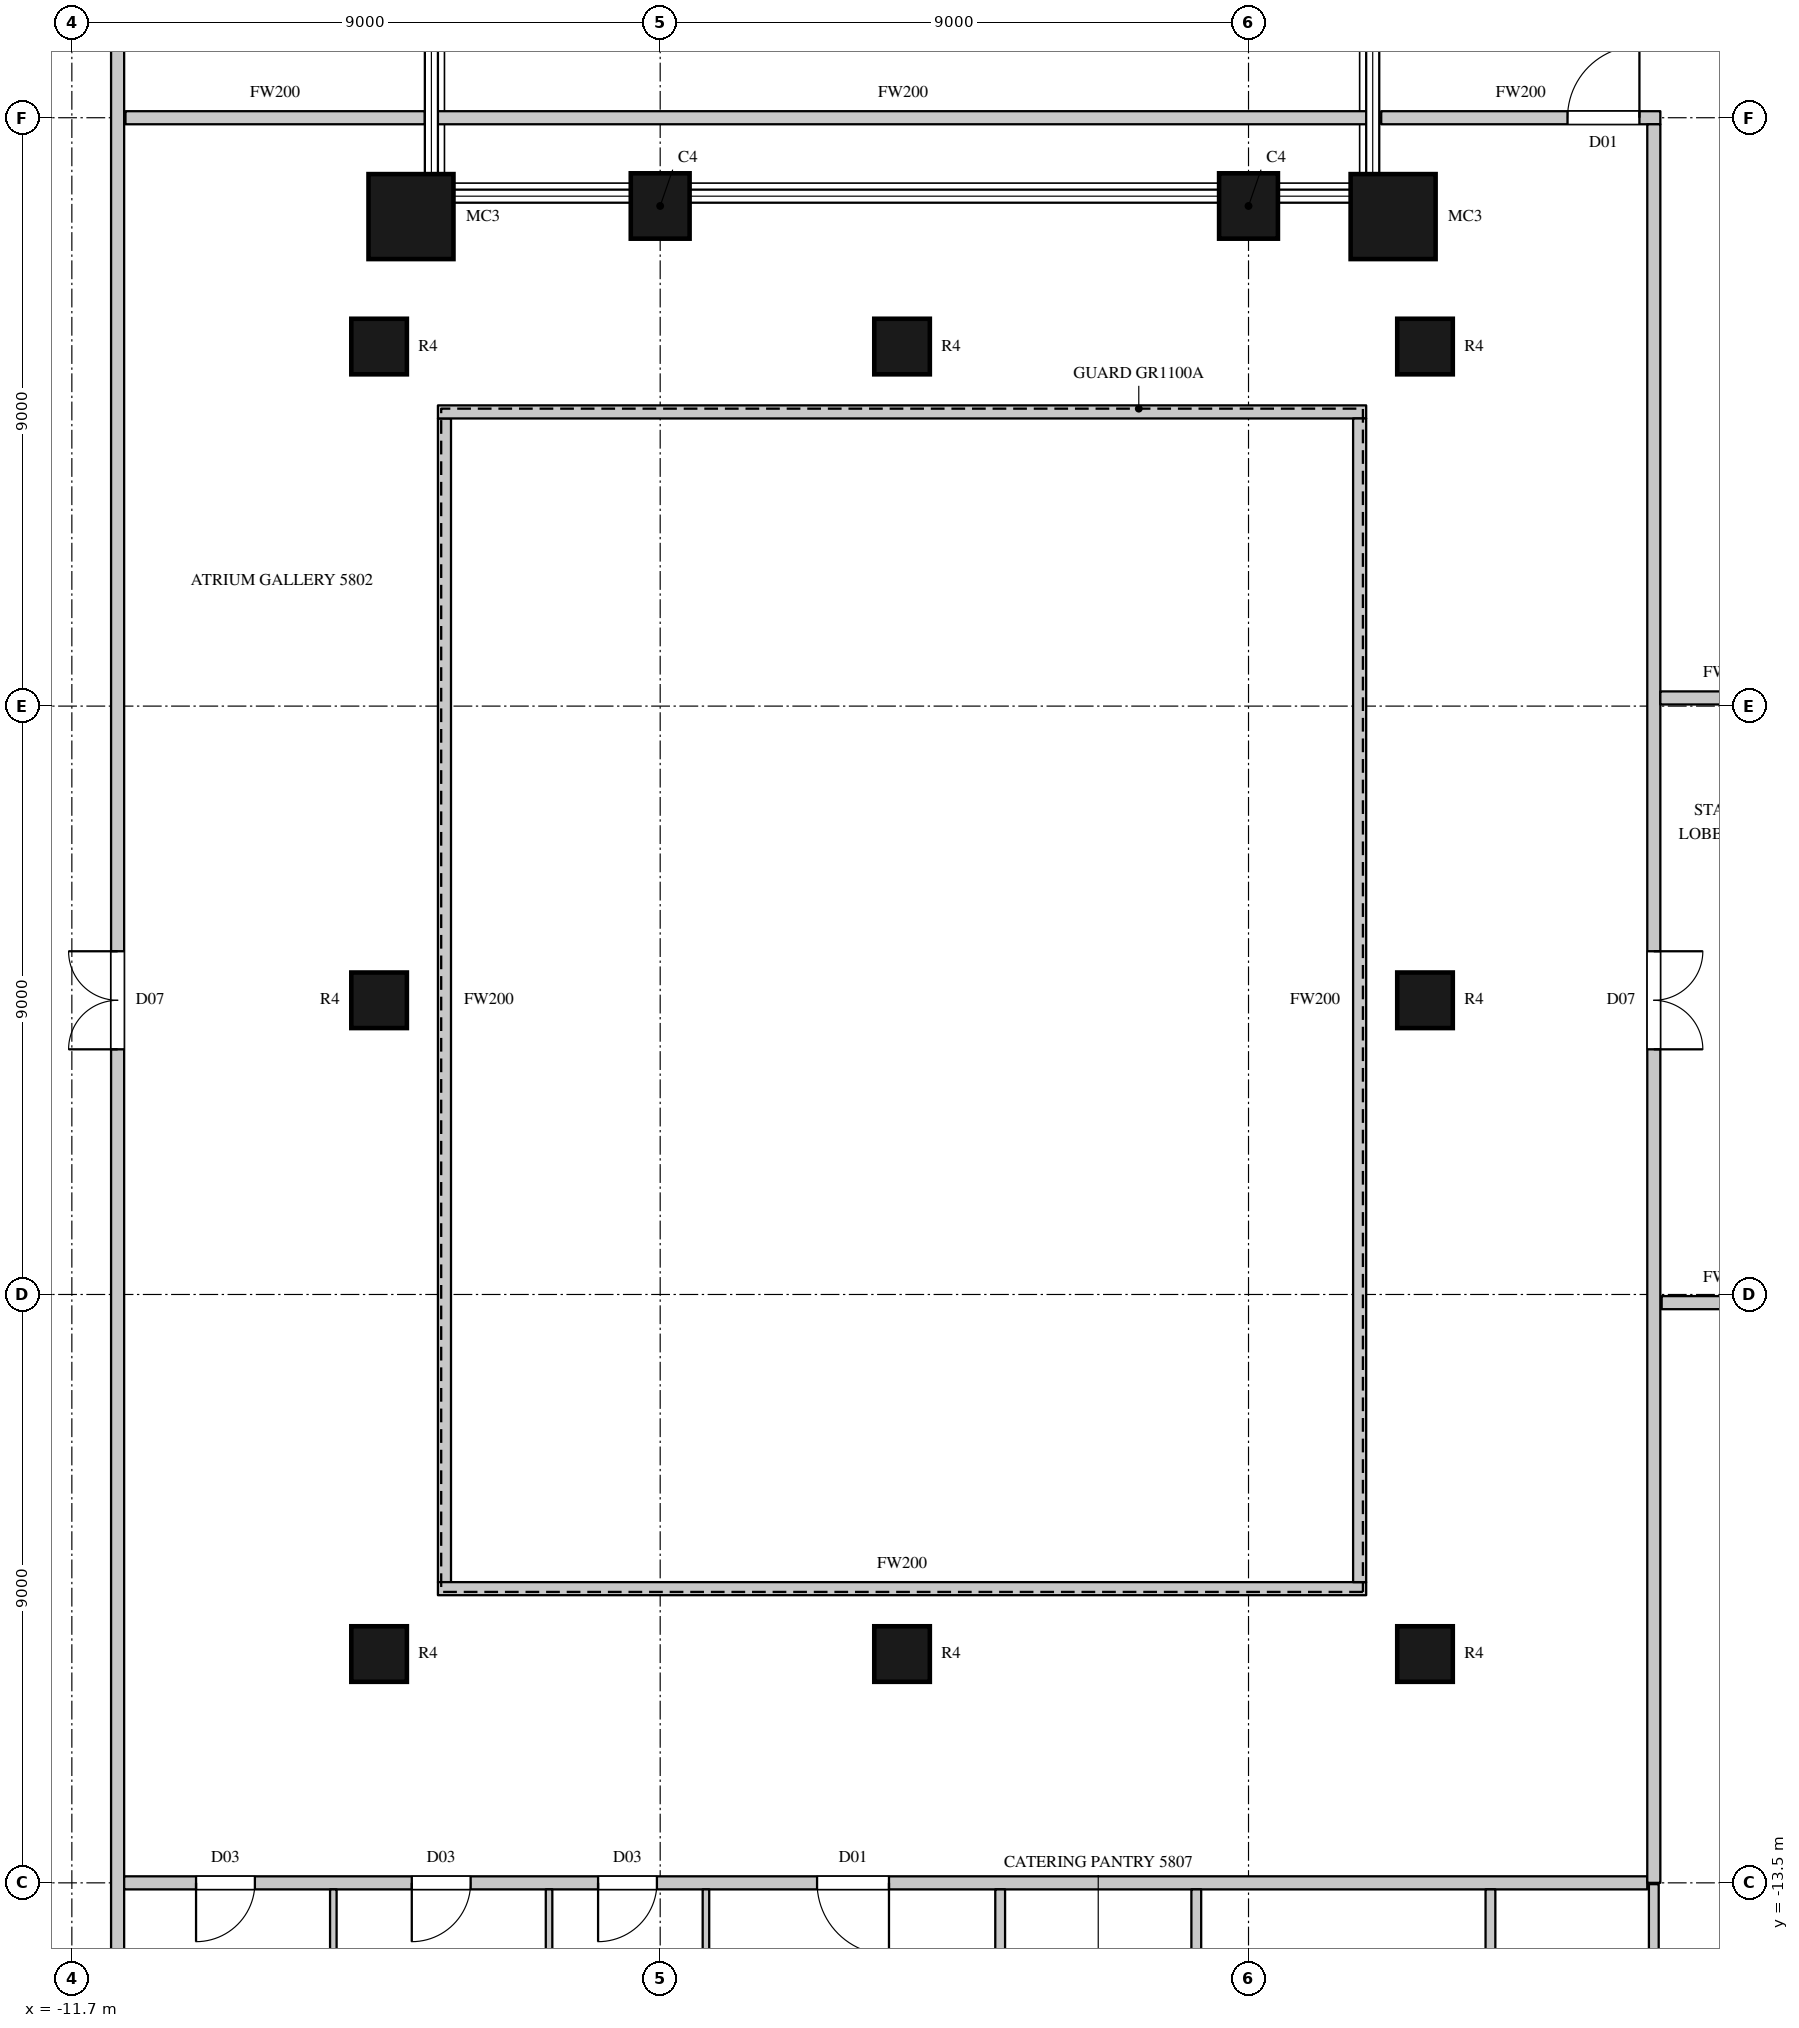
"""IFC4 building model, lengths in metres.
Left out: names, types, materials, properties, quantities, classifications, styles, units other than length and angle.
Written with IfcOpenShell. Run it as: python <this file> out.ifc"""

import sys

from ifc_helpers import new_model, si_unit, direction, frame, frame_2d, origin, origin_2d, place, context, subcontext, project, spatial, rectangle, circle, extrude, element, fill, save


model = new_model("IFC4")
c1 = context("Model", 3, precision=1e-05, world=origin(), true_north=direction((0.0, 1.0)))
c2 = subcontext(c1, "Body", "Model", "MODEL_VIEW")
j1 = project(units=[si_unit("LENGTHUNIT", "METRE"), si_unit("PLANEANGLEUNIT", "RADIAN")], contexts=[c1])
p1 = place(None, origin())
s1 = spatial("IfcSite", under=j1, at=p1, CompositionType="ELEMENT")
p2 = place(p1, origin())
s2 = spatial("IfcBuilding", under=s1, at=p2, CompositionType="ELEMENT")
p3 = place(p2, frame((0.0, 0.0, 259.8)))
s3 = spatial("IfcBuildingStorey", under=s2, at=p3, CompositionType="ELEMENT", Elevation=259.8)
p4 = place(p3, frame((8.512, 11.988, 0.0), z_axis=(0.0, 0.0, 1.0), x_axis=(1.0, 0.0, 0.0)))
e1 = element("IfcColumn", 1, at=p4, inside=s3, PredefinedType="COLUMN", context=c2, shape_type="SweptSolid", body=[
    extrude(circle(Radius=0.65, at=origin_2d()), origin(), (0.0, 0.0, 1.0), 4.1),
])
for number, where, z_axis, x_axis in (
    (2, (6.3, 12.15, 0.0), (0.0, 0.0, 1.0), (-1.0, 0.0, 0.0)),
    (3, (-2.7, 12.15, 0.0), (0.0, 0.0, 1.0), (-1.0, 0.0, 0.0)),
):
    element("IfcColumn", number, at=place(p3, frame(where, z_axis=z_axis, x_axis=x_axis)), inside=s3, PredefinedType="COLUMN", context=c2, shape_type="SweptSolid", body=[
        extrude(rectangle(XDim=0.9, YDim=1.0, at=origin_2d()), origin(), (0.0, 0.0, 1.0), 4.1),
    ])
p5 = place(p3, frame((-6.512, 11.988, 0.0), z_axis=(0.0, 0.0, 1.0), x_axis=(1.0, 0.0, 0.0)))
e4 = element("IfcColumn", 4, at=p5, inside=s3, PredefinedType="COLUMN", context=c2, shape_type="SweptSolid", body=[
    extrude(circle(Radius=0.65, at=origin_2d()), origin(), (0.0, 0.0, 1.0), 4.1),
])
for number, where, z_axis, x_axis in (
    (5, (-7.0, -10.0, 0.0), (0.0, 0.0, 1.0), (1.0, 0.0, 0.0)),
    (6, (-7.0, 0.0, 0.0), (0.0, 0.0, 1.0), (1.0, 0.0, 0.0)),
    (7, (-7.0, 10.0, 0.0), (0.0, 0.0, 1.0), (1.0, 0.0, 0.0)),
    (8, (1.0, -10.0, 0.0), (0.0, 0.0, 1.0), (1.0, 0.0, 0.0)),
    (9, (1.0, 10.0, 0.0), (0.0, 0.0, 1.0), (1.0, 0.0, 0.0)),
    (10, (9.0, -10.0, 0.0), (0.0, 0.0, 1.0), (1.0, 0.0, 0.0)),
    (11, (9.0, 0.0, 0.0), (0.0, 0.0, 1.0), (1.0, 0.0, 0.0)),
    (12, (9.0, 10.0, 0.0), (0.0, 0.0, 1.0), (1.0, 0.0, 0.0)),
):
    element("IfcColumn", number, at=place(p3, frame(where, z_axis=z_axis, x_axis=x_axis)), inside=s3, PredefinedType="COLUMN", context=c2, shape_type="SweptSolid", body=[
        extrude(circle(Radius=0.425, at=origin_2d()), origin(), (0.0, 0.0, 1.0), 4.1),
    ])
p6 = place(p3, frame((-11.0, -14.8, 0.0), z_axis=(0.0, 0.0, 1.0), x_axis=(0.0, 1.0, 0.0)))
e13 = element("IfcWall", 13, at=p6, inside=s3, PredefinedType="PARTITIONING", context=c2, shape_type="SweptSolid", body=[
    extrude(rectangle(XDim=29.5, YDim=0.2, at=frame_2d((14.75, 0.0))), origin(), (0.0, 0.0, 1.0), 3.8),
])
p7 = place(p6, frame((14.05, 0.0, 0.0)))
e14 = element("IfcOpeningElement", 14, at=p7, cuts=e13, PredefinedType="OPENING", context=c2, shape_type="SweptSolid", body=[
    extrude(rectangle(XDim=1.5, YDim=2.4, at=frame_2d((0.75, 1.2))), frame((0.0, 0.11, 0.0), z_axis=(0.0, -1.0, 0.0), x_axis=(1.0, 0.0, 0.0)), (0.0, 0.0, 1.0), 0.22),
])
p8 = place(p3, frame((-10.9, -13.5, 0.0), z_axis=(0.0, 0.0, 1.0), x_axis=(1.0, 0.0, 0.0)))
e15 = element("IfcWall", 15, at=p8, inside=s3, PredefinedType="PARTITIONING", context=c2, shape_type="SweptSolid", body=[
    extrude(rectangle(XDim=23.3, YDim=0.2, at=frame_2d((11.65, 0.0))), origin(), (0.0, 0.0, 1.0), 3.8),
])
p9 = place(p8, frame((1.1, 0.0, 0.0)))
e16 = element("IfcOpeningElement", 16, at=p9, cuts=e15, PredefinedType="OPENING", context=c2, shape_type="SweptSolid", body=[
    extrude(rectangle(XDim=0.9, YDim=2.2, at=frame_2d((0.45, 1.1))), frame((0.0, 0.11, 0.0), z_axis=(0.0, -1.0, 0.0), x_axis=(1.0, 0.0, 0.0)), (0.0, 0.0, 1.0), 0.22),
])
p10 = place(p8, frame((4.4, 0.0, 0.0)))
e17 = element("IfcOpeningElement", 17, at=p10, cuts=e15, PredefinedType="OPENING", context=c2, shape_type="SweptSolid", body=[
    extrude(rectangle(XDim=0.9, YDim=2.2, at=frame_2d((0.45, 1.1))), frame((0.0, 0.11, 0.0), z_axis=(0.0, -1.0, 0.0), x_axis=(1.0, 0.0, 0.0)), (0.0, 0.0, 1.0), 0.22),
])
p11 = place(p8, frame((7.25, 0.0, 0.0)))
e18 = element("IfcOpeningElement", 18, at=p11, cuts=e15, PredefinedType="OPENING", context=c2, shape_type="SweptSolid", body=[
    extrude(rectangle(XDim=0.9, YDim=2.2, at=frame_2d((0.45, 1.1))), frame((0.0, 0.11, 0.0), z_axis=(0.0, -1.0, 0.0), x_axis=(1.0, 0.0, 0.0)), (0.0, 0.0, 1.0), 0.22),
])
p12 = place(p8, frame((10.6, 0.0, 0.0)))
e19 = element("IfcOpeningElement", 19, at=p12, cuts=e15, PredefinedType="OPENING", context=c2, shape_type="SweptSolid", body=[
    extrude(rectangle(XDim=1.1, YDim=2.4, at=frame_2d((0.55, 1.2))), frame((0.0, 0.11, 0.0), z_axis=(0.0, -1.0, 0.0), x_axis=(1.0, 0.0, 0.0)), (0.0, 0.0, 1.0), 0.22),
])
p13 = place(p3, frame((-10.88, 13.5, 0.0), z_axis=(0.0, 0.0, 1.0), x_axis=(1.0, 0.0, 0.0)))
e20 = element("IfcWall", 20, at=p13, inside=s3, PredefinedType="PARTITIONING", context=c2, shape_type="SweptSolid", body=[
    extrude(rectangle(XDim=4.58, YDim=0.2, at=frame_2d((2.29, 0.0))), origin(), (0.0, 0.0, 1.0), 3.8),
])
p14 = place(p3, frame((-6.27, 13.5, 0.0), z_axis=(0.0, 0.0, 1.0), x_axis=(1.0, 0.0, 0.0)))
e21 = element("IfcWall", 21, at=p14, inside=s3, PredefinedType="PARTITIONING", context=c2, shape_type="SweptSolid", body=[
    extrude(rectangle(XDim=14.57, YDim=0.2, at=frame_2d((7.285, 0.0))), origin(), (0.0, 0.0, 1.0), 3.8),
])
p15 = place(p3, frame((-6.0, -8.9, 0.0), z_axis=(0.0, 0.0, 1.0), x_axis=(0.0, 1.0, 0.0)))
e22 = element("IfcWall", 22, at=p15, inside=s3, PredefinedType="PARTITIONING", context=c2, shape_type="SweptSolid", body=[
    extrude(rectangle(XDim=17.8, YDim=0.2, at=frame_2d((8.9, 0.0))), origin(), (0.0, 0.0, 1.0), 3.8),
])
for number, where, z_axis, x_axis in (
    (23, (-6.1, -9.0, 0.0), (0.0, 0.0, 1.0), (1.0, 0.0, 0.0)),
    (24, (-6.1, 9.0, 0.0), (0.0, 0.0, 1.0), (1.0, 0.0, 0.0)),
):
    element("IfcWall", number, at=place(p3, frame(where, z_axis=z_axis, x_axis=x_axis)), inside=s3, PredefinedType="PARTITIONING", context=c2, shape_type="SweptSolid", body=[
        extrude(rectangle(XDim=14.2, YDim=0.2, at=frame_2d((7.1, 0.0))), origin(), (0.0, 0.0, 1.0), 3.8),
    ])
p16 = place(p3, frame((8.0, -8.9, 0.0), z_axis=(0.0, 0.0, 1.0), x_axis=(0.0, 1.0, 0.0)))
e25 = element("IfcWall", 25, at=p16, inside=s3, PredefinedType="PARTITIONING", context=c2, shape_type="SweptSolid", body=[
    extrude(rectangle(XDim=17.8, YDim=0.2, at=frame_2d((8.9, 0.0))), origin(), (0.0, 0.0, 1.0), 3.8),
])
p17 = place(p3, frame((8.33, 13.5, 0.0), z_axis=(0.0, 0.0, 1.0), x_axis=(1.0, 0.0, 0.0)))
e26 = element("IfcWall", 26, at=p17, inside=s3, PredefinedType="PARTITIONING", context=c2, shape_type="SweptSolid", body=[
    extrude(rectangle(XDim=4.27, YDim=0.2, at=frame_2d((2.135, 0.0))), origin(), (0.0, 0.0, 1.0), 3.8),
])
p18 = place(p17, frame((2.85, 0.0, 0.0)))
e27 = element("IfcOpeningElement", 27, at=p18, cuts=e26, PredefinedType="OPENING", context=c2, shape_type="SweptSolid", body=[
    extrude(rectangle(XDim=1.1, YDim=2.4, at=frame_2d((0.55, 1.2))), frame((0.0, 0.11, 0.0), z_axis=(0.0, -1.0, 0.0), x_axis=(1.0, 0.0, 0.0)), (0.0, 0.0, 1.0), 0.22),
])
p19 = place(p3, frame((12.5, -13.5, 0.0), z_axis=(0.0, 0.0, 1.0), x_axis=(0.0, 1.0, 0.0)))
e28 = element("IfcWall", 28, at=p19, inside=s3, PredefinedType="PARTITIONING", context=c2, shape_type="SweptSolid", body=[
    extrude(rectangle(XDim=26.9, YDim=0.2, at=frame_2d((13.45, 0.0))), origin(), (0.0, 0.0, 1.0), 3.8),
])
p20 = place(p19, frame((12.75, 0.0, 0.0)))
e29 = element("IfcOpeningElement", 29, at=p20, cuts=e28, PredefinedType="OPENING", context=c2, shape_type="SweptSolid", body=[
    extrude(rectangle(XDim=1.5, YDim=2.4, at=frame_2d((0.75, 1.2))), frame((0.0, 0.11, 0.0), z_axis=(0.0, -1.0, 0.0), x_axis=(1.0, 0.0, 0.0)), (0.0, 0.0, 1.0), 0.22),
])
p21 = place(p3, frame((12.6, 4.625, 0.0), z_axis=(0.0, 0.0, 1.0), x_axis=(1.0, 0.0, 0.0)))
e30 = element("IfcWall", 30, at=p21, inside=s3, PredefinedType="PARTITIONING", context=c2, shape_type="SweptSolid", body=[
    extrude(rectangle(XDim=2.075, YDim=0.2, at=frame_2d((1.038, 0.0))), origin(), (0.0, 0.0, 1.0), 3.8),
])
p22 = place(p3, frame((12.62, -4.625, 0.0), z_axis=(0.0, 0.0, 1.0), x_axis=(1.0, 0.0, 0.0)))
e31 = element("IfcWall", 31, at=p22, inside=s3, PredefinedType="PARTITIONING", context=c2, shape_type="SweptSolid", body=[
    extrude(rectangle(XDim=2.035, YDim=0.2, at=frame_2d((1.018, 0.0))), origin(), (0.0, 0.0, 1.0), 3.8),
])
p23 = place(p3, frame((2.501, -17.625, 0.0), z_axis=(0.0, 0.0, 1.0), x_axis=(0.0, 1.0, 0.0)))
e32 = element("IfcWall", 32, at=p23, inside=s3, PredefinedType="PARTITIONING", context=c2, shape_type="SweptSolid", body=[
    extrude(rectangle(XDim=4.025, YDim=0.15, at=frame_2d((2.012, 0.0))), origin(), (0.0, 0.0, 1.0), 3.8),
])
p24 = place(p23, frame((1.55, 0.0, 0.0)))
e33 = element("IfcOpeningElement", 33, at=p24, cuts=e32, PredefinedType="OPENING", context=c2, shape_type="SweptSolid", body=[
    extrude(rectangle(XDim=0.95, YDim=2.2, at=frame_2d((0.475, 1.1))), frame((0.0, 0.085, 0.0), z_axis=(0.0, -1.0, 0.0), x_axis=(1.0, 0.0, 0.0)), (0.0, 0.0, 1.0), 0.17),
])
for number, where, z_axis, x_axis in (
    (34, (5.501, -17.625, 0.0), (0.0, 0.0, 1.0), (0.0, 1.0, 0.0)),
    (35, (10.001, -17.625, 0.0), (0.0, 0.0, 1.0), (0.0, 1.0, 0.0)),
):
    element("IfcWall", number, at=place(p3, frame(where, z_axis=z_axis, x_axis=x_axis)), inside=s3, PredefinedType="PARTITIONING", context=c2, shape_type="SweptSolid", body=[
        extrude(rectangle(XDim=4.025, YDim=0.15, at=frame_2d((2.012, 0.0))), origin(), (0.0, 0.0, 1.0), 3.8),
    ])
p25 = place(p3, frame((12.5, -20.095, 0.0), z_axis=(0.0, 0.0, 1.0), x_axis=(0.0, 1.0, 0.0)))
e36 = element("IfcWall", 36, at=p25, inside=s3, PredefinedType="PARTITIONING", context=c2, shape_type="SweptSolid", body=[
    extrude(rectangle(XDim=6.575, YDim=0.15, at=frame_2d((3.288, 0.0))), origin(), (0.0, 0.0, 1.0), 3.8),
])
for number, where, z_axis, x_axis in (
    (37, (-7.7, -24.04, 0.0), (0.0, 0.0, 1.0), (0.0, 1.0, 0.0)),
    (38, (-4.4, -24.04, 0.0), (0.0, 0.0, 1.0), (0.0, 1.0, 0.0)),
):
    element("IfcWall", number, at=place(p3, frame(where, z_axis=z_axis, x_axis=x_axis)), inside=s3, PredefinedType="PARTITIONING", context=c2, shape_type="SweptSolid", body=[
        extrude(rectangle(XDim=10.44, YDim=0.1, at=frame_2d((5.22, 0.0))), origin(), (0.0, 0.0, 1.0), 3.8),
    ])
p26 = place(p3, frame((-2.0, -23.447, 0.0), z_axis=(0.0, 0.0, 1.0), x_axis=(0.0, 1.0, 0.0)))
e39 = element("IfcWall", 39, at=p26, inside=s3, PredefinedType="PARTITIONING", context=c2, shape_type="SweptSolid", body=[
    extrude(rectangle(XDim=9.847, YDim=0.1, at=frame_2d((4.924, 0.0))), origin(), (0.0, 0.0, 1.0), 3.8),
])
p27 = place(p7, origin())
e40 = element("IfcDoor", 40, at=p27, inside=s3, OperationType="DOUBLE_DOOR_SINGLE_SWING", PredefinedType="DOOR", context=c2, shape_type="SweptSolid", body=[
    extrude(rectangle(XDim=1.5, YDim=2.4, at=frame_2d((0.75, 1.2))), frame((0.0, 0.025, 0.0), z_axis=(0.0, -1.0, 0.0), x_axis=(1.0, 0.0, 0.0)), (0.0, 0.0, 1.0), 0.05),
])
fill(e14, e40)
p28 = place(p20, origin())
e41 = element("IfcDoor", 41, at=p28, inside=s3, OperationType="DOUBLE_DOOR_SINGLE_SWING", PredefinedType="DOOR", context=c2, shape_type="SweptSolid", body=[
    extrude(rectangle(XDim=1.5, YDim=2.4, at=frame_2d((0.75, 1.2))), frame((0.0, 0.025, 0.0), z_axis=(0.0, -1.0, 0.0), x_axis=(1.0, 0.0, 0.0)), (0.0, 0.0, 1.0), 0.05),
])
fill(e29, e41)
p29 = place(p9, origin())
e42 = element("IfcDoor", 42, at=p29, inside=s3, OperationType="SINGLE_SWING_RIGHT", PredefinedType="DOOR", context=c2, shape_type="SweptSolid", body=[
    extrude(rectangle(XDim=0.9, YDim=2.2, at=frame_2d((0.45, 1.1))), frame((0.0, 0.025, 0.0), z_axis=(0.0, -1.0, 0.0), x_axis=(1.0, 0.0, 0.0)), (0.0, 0.0, 1.0), 0.05),
])
fill(e16, e42)
p30 = place(p10, origin())
e43 = element("IfcDoor", 43, at=p30, inside=s3, OperationType="SINGLE_SWING_RIGHT", PredefinedType="DOOR", context=c2, shape_type="SweptSolid", body=[
    extrude(rectangle(XDim=0.9, YDim=2.2, at=frame_2d((0.45, 1.1))), frame((0.0, 0.025, 0.0), z_axis=(0.0, -1.0, 0.0), x_axis=(1.0, 0.0, 0.0)), (0.0, 0.0, 1.0), 0.05),
])
fill(e17, e43)
p31 = place(p11, origin())
e44 = element("IfcDoor", 44, at=p31, inside=s3, OperationType="SINGLE_SWING_RIGHT", PredefinedType="DOOR", context=c2, shape_type="SweptSolid", body=[
    extrude(rectangle(XDim=0.9, YDim=2.2, at=frame_2d((0.45, 1.1))), frame((0.0, 0.025, 0.0), z_axis=(0.0, -1.0, 0.0), x_axis=(1.0, 0.0, 0.0)), (0.0, 0.0, 1.0), 0.05),
])
fill(e18, e44)
p32 = place(p12, origin())
e45 = element("IfcDoor", 45, at=p32, inside=s3, OperationType="SINGLE_SWING_LEFT", PredefinedType="DOOR", context=c2, shape_type="SweptSolid", body=[
    extrude(rectangle(XDim=1.1, YDim=2.4, at=frame_2d((0.55, 1.2))), frame((0.0, 0.025, 0.0), z_axis=(0.0, -1.0, 0.0), x_axis=(1.0, 0.0, 0.0)), (0.0, 0.0, 1.0), 0.05),
])
fill(e19, e45)
p33 = place(p18, origin())
e46 = element("IfcDoor", 46, at=p33, inside=s3, OperationType="SINGLE_SWING_RIGHT", PredefinedType="DOOR", context=c2, shape_type="SweptSolid", body=[
    extrude(rectangle(XDim=1.1, YDim=2.4, at=frame_2d((0.55, 1.2))), frame((0.0, 0.025, 0.0), z_axis=(0.0, -1.0, 0.0), x_axis=(1.0, 0.0, 0.0)), (0.0, 0.0, 1.0), 0.05),
])
fill(e27, e46)
save(model, sys.argv[1])
